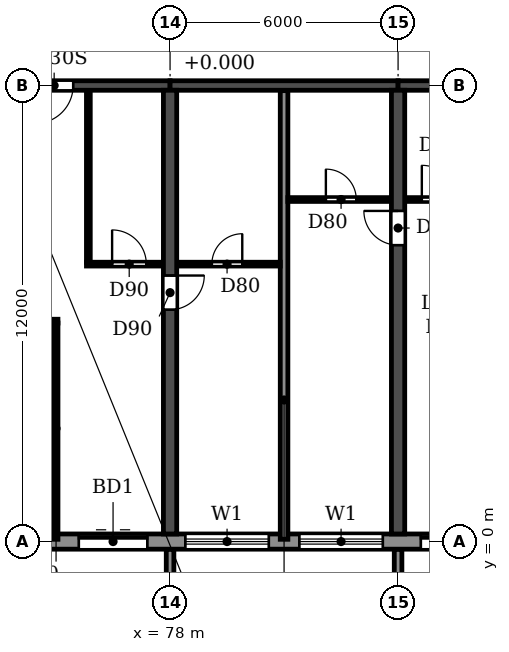
"""IFC4 building model, lengths in metres.
Left out: names, types, materials, properties, quantities, classifications, styles, units other than length and angle.
Written with IfcOpenShell. Run it as: python <this file> out.ifc"""

import sys

from ifc_helpers import new_model, si_unit, direction, frame, frame_2d, origin, place, context, subcontext, project, spatial, polyline, rectangle, outline, extrude, source, transform, mapped, element, fill, save


model = new_model("IFC4")
c1 = context("Model", 3, precision=1e-05, world=origin(), true_north=direction((0.0, 1.0)))
c2 = subcontext(c1, "Body", "Model", "MODEL_VIEW")
j1 = project(units=[si_unit("LENGTHUNIT", "METRE"), si_unit("PLANEANGLEUNIT", "RADIAN")], contexts=[c1])
p1 = place(None, origin())
s1 = spatial("IfcSite", under=j1, at=p1, CompositionType="ELEMENT")
p2 = place(p1, origin())
s2 = spatial("IfcBuilding", under=s1, at=p2, CompositionType="ELEMENT")
p3 = place(p2, frame((0.0, 0.0, 76.2)))
s3 = spatial("IfcBuildingStorey", under=s2, at=p3, CompositionType="ELEMENT", Elevation=76.2)
p4 = place(p3, frame((78.0, 0.2, 0.0), z_axis=(0.0, 0.0, 1.0), x_axis=(0.0, 1.0, 0.0)))
e1 = element("IfcWall", 1, at=p4, inside=s3, PredefinedType="SHEAR", context=c2, shape_type="SweptSolid", body=[
    extrude(rectangle(XDim=11.675, YDim=0.35, at=frame_2d((5.837, 0.0))), origin(), (0.0, 0.0, 1.0), 3.06),
])
p5 = place(p4, frame((5.9, 0.0, 0.0)))
e2 = element("IfcOpeningElement", 2, at=p5, cuts=e1, PredefinedType="OPENING", context=c2, shape_type="SweptSolid", body=[
    extrude(rectangle(XDim=0.9, YDim=2.1, at=frame_2d((0.45, 1.05))), frame((0.0, 0.185, 0.0), z_axis=(0.0, -1.0, 0.0), x_axis=(1.0, 0.0, 0.0)), (0.0, 0.0, 1.0), 0.37),
])
p6 = place(p3, frame((84.0, 0.2, 0.0), z_axis=(0.0, 0.0, 1.0), x_axis=(0.0, 1.0, 0.0)))
e3 = element("IfcWall", 3, at=p6, inside=s3, PredefinedType="SHEAR", context=c2, shape_type="SweptSolid", body=[
    extrude(rectangle(XDim=11.675, YDim=0.35, at=frame_2d((5.837, 0.0))), origin(), (0.0, 0.0, 1.0), 3.06),
])
p7 = place(p6, frame((7.6, 0.0, 0.0)))
e4 = element("IfcOpeningElement", 4, at=p7, cuts=e3, PredefinedType="OPENING", context=c2, shape_type="SweptSolid", body=[
    extrude(rectangle(XDim=0.9, YDim=2.1, at=frame_2d((0.45, 1.05))), frame((0.0, 0.185, 0.0), z_axis=(0.0, -1.0, 0.0), x_axis=(1.0, 0.0, 0.0)), (0.0, 0.0, 1.0), 0.37),
])
p8 = place(p3, frame((72.0, 12.0, 0.0), z_axis=(0.0, 0.0, 1.0), x_axis=(1.0, 0.0, 0.0)))
e5 = element("IfcWall", 5, at=p8, inside=s3, PredefinedType="SHEAR", context=c2, shape_type="SweptSolid", body=[
    extrude(rectangle(XDim=6.0, YDim=0.25, at=frame_2d((3.0, 0.0))), origin(), (0.0, 0.0, 1.0), 2.46),
])
p9 = place(p8, frame((2.45, 0.0, 0.0)))
e6 = element("IfcOpeningElement", 6, at=p9, cuts=e5, PredefinedType="OPENING", context=c2, shape_type="SweptSolid", body=[
    extrude(rectangle(XDim=1.0, YDim=2.1, at=frame_2d((0.5, 1.05))), frame((0.0, 0.135, 0.0), z_axis=(0.0, -1.0, 0.0), x_axis=(1.0, 0.0, 0.0)), (0.0, 0.0, 1.0), 0.27),
])
p10 = place(p3, frame((78.0, 12.0, 0.0), z_axis=(0.0, 0.0, 1.0), x_axis=(1.0, 0.0, 0.0)))
e7 = element("IfcWall", 7, at=p10, inside=s3, PredefinedType="SHEAR", context=c2, shape_type="SweptSolid", body=[
    extrude(rectangle(XDim=6.0, YDim=0.25, at=frame_2d((3.0, 0.0))), origin(), (0.0, 0.0, 1.0), 2.46),
])
p11 = place(p3, frame((84.0, 12.0, 0.0), z_axis=(0.0, 0.0, 1.0), x_axis=(1.0, 0.0, 0.0)))
e8 = element("IfcWall", 8, at=p11, inside=s3, PredefinedType="SHEAR", context=c2, shape_type="SweptSolid", body=[
    extrude(rectangle(XDim=6.0, YDim=0.25, at=frame_2d((3.0, 0.0))), origin(), (0.0, 0.0, 1.0), 2.46),
])
p12 = place(p11, frame((2.55, 0.0, 0.0)))
e9 = element("IfcOpeningElement", 9, at=p12, cuts=e8, PredefinedType="OPENING", context=c2, shape_type="SweptSolid", body=[
    extrude(rectangle(XDim=1.0, YDim=2.1, at=frame_2d((0.5, 1.05))), frame((0.0, 0.135, 0.0), z_axis=(0.0, -1.0, 0.0), x_axis=(1.0, 0.0, 0.0)), (0.0, 0.0, 1.0), 0.27),
])
p13 = place(p3, frame((10.683, 0.0, 0.0), z_axis=(0.0, 0.0, 1.0), x_axis=(1.0, 0.0, 0.0)))
e10 = element("IfcWall", 10, at=p13, inside=s3, PredefinedType="STANDARD", context=c2, shape_type="SweptSolid", body=[
    extrude(rectangle(XDim=80.634, YDim=0.4, at=frame_2d((40.317, 0.0))), origin(), (0.0, 0.0, 1.0), 3.06),
])
p14 = place(p13, frame((1.717, 0.0, 0.9)))
e11 = element("IfcOpeningElement", 11, at=p14, cuts=e10, PredefinedType="OPENING", context=c2, shape_type="SweptSolid", body=[
    extrude(rectangle(XDim=2.2, YDim=1.5, at=frame_2d((1.1, 0.75))), frame((0.0, 0.21, 0.0), z_axis=(0.0, -1.0, 0.0), x_axis=(1.0, 0.0, 0.0)), (0.0, 0.0, 1.0), 0.42),
])
p15 = place(p13, frame((4.917, 0.0, 0.0)))
e12 = element("IfcOpeningElement", 12, at=p15, cuts=e10, PredefinedType="OPENING", context=c2, shape_type="SweptSolid", body=[
    extrude(rectangle(XDim=1.8, YDim=2.4, at=frame_2d((0.9, 1.2))), frame((0.0, 0.21, 0.0), z_axis=(0.0, -1.0, 0.0), x_axis=(1.0, 0.0, 0.0)), (0.0, 0.0, 1.0), 0.42),
])
p16 = place(p13, frame((7.717, 0.0, 0.9)))
e13 = element("IfcOpeningElement", 13, at=p16, cuts=e10, PredefinedType="OPENING", context=c2, shape_type="SweptSolid", body=[
    extrude(rectangle(XDim=2.2, YDim=1.5, at=frame_2d((1.1, 0.75))), frame((0.0, 0.21, 0.0), z_axis=(0.0, -1.0, 0.0), x_axis=(1.0, 0.0, 0.0)), (0.0, 0.0, 1.0), 0.42),
])
p17 = place(p13, frame((10.717, 0.0, 0.9)))
e14 = element("IfcOpeningElement", 14, at=p17, cuts=e10, PredefinedType="OPENING", context=c2, shape_type="SweptSolid", body=[
    extrude(rectangle(XDim=2.2, YDim=1.5, at=frame_2d((1.1, 0.75))), frame((0.0, 0.21, 0.0), z_axis=(0.0, -1.0, 0.0), x_axis=(1.0, 0.0, 0.0)), (0.0, 0.0, 1.0), 0.42),
])
p18 = place(p13, frame((13.717, 0.0, 0.9)))
e15 = element("IfcOpeningElement", 15, at=p18, cuts=e10, PredefinedType="OPENING", context=c2, shape_type="SweptSolid", body=[
    extrude(rectangle(XDim=2.2, YDim=1.5, at=frame_2d((1.1, 0.75))), frame((0.0, 0.21, 0.0), z_axis=(0.0, -1.0, 0.0), x_axis=(1.0, 0.0, 0.0)), (0.0, 0.0, 1.0), 0.42),
])
p19 = place(p13, frame((16.917, 0.0, 0.0)))
e16 = element("IfcOpeningElement", 16, at=p19, cuts=e10, PredefinedType="OPENING", context=c2, shape_type="SweptSolid", body=[
    extrude(rectangle(XDim=1.8, YDim=2.4, at=frame_2d((0.9, 1.2))), frame((0.0, 0.21, 0.0), z_axis=(0.0, -1.0, 0.0), x_axis=(1.0, 0.0, 0.0)), (0.0, 0.0, 1.0), 0.42),
])
p20 = place(p13, frame((19.717, 0.0, 0.9)))
e17 = element("IfcOpeningElement", 17, at=p20, cuts=e10, PredefinedType="OPENING", context=c2, shape_type="SweptSolid", body=[
    extrude(rectangle(XDim=2.2, YDim=1.5, at=frame_2d((1.1, 0.75))), frame((0.0, 0.21, 0.0), z_axis=(0.0, -1.0, 0.0), x_axis=(1.0, 0.0, 0.0)), (0.0, 0.0, 1.0), 0.42),
])
p21 = place(p13, frame((22.717, 0.0, 0.9)))
e18 = element("IfcOpeningElement", 18, at=p21, cuts=e10, PredefinedType="OPENING", context=c2, shape_type="SweptSolid", body=[
    extrude(rectangle(XDim=2.2, YDim=1.5, at=frame_2d((1.1, 0.75))), frame((0.0, 0.21, 0.0), z_axis=(0.0, -1.0, 0.0), x_axis=(1.0, 0.0, 0.0)), (0.0, 0.0, 1.0), 0.42),
])
p22 = place(p13, frame((25.917, 0.0, 0.0)))
e19 = element("IfcOpeningElement", 19, at=p22, cuts=e10, PredefinedType="OPENING", context=c2, shape_type="SweptSolid", body=[
    extrude(rectangle(XDim=1.8, YDim=2.4, at=frame_2d((0.9, 1.2))), frame((0.0, 0.21, 0.0), z_axis=(0.0, -1.0, 0.0), x_axis=(1.0, 0.0, 0.0)), (0.0, 0.0, 1.0), 0.42),
])
p23 = place(p13, frame((28.717, 0.0, 0.9)))
e20 = element("IfcOpeningElement", 20, at=p23, cuts=e10, PredefinedType="OPENING", context=c2, shape_type="SweptSolid", body=[
    extrude(rectangle(XDim=2.2, YDim=1.5, at=frame_2d((1.1, 0.75))), frame((0.0, 0.21, 0.0), z_axis=(0.0, -1.0, 0.0), x_axis=(1.0, 0.0, 0.0)), (0.0, 0.0, 1.0), 0.42),
])
p24 = place(p13, frame((31.717, 0.0, 0.9)))
e21 = element("IfcOpeningElement", 21, at=p24, cuts=e10, PredefinedType="OPENING", context=c2, shape_type="SweptSolid", body=[
    extrude(rectangle(XDim=2.2, YDim=1.5, at=frame_2d((1.1, 0.75))), frame((0.0, 0.21, 0.0), z_axis=(0.0, -1.0, 0.0), x_axis=(1.0, 0.0, 0.0)), (0.0, 0.0, 1.0), 0.42),
])
p25 = place(p13, frame((34.717, 0.0, 0.9)))
e22 = element("IfcOpeningElement", 22, at=p25, cuts=e10, PredefinedType="OPENING", context=c2, shape_type="SweptSolid", body=[
    extrude(rectangle(XDim=2.2, YDim=1.5, at=frame_2d((1.1, 0.75))), frame((0.0, 0.21, 0.0), z_axis=(0.0, -1.0, 0.0), x_axis=(1.0, 0.0, 0.0)), (0.0, 0.0, 1.0), 0.42),
])
p26 = place(p13, frame((37.917, 0.0, 0.0)))
e23 = element("IfcOpeningElement", 23, at=p26, cuts=e10, PredefinedType="OPENING", context=c2, shape_type="SweptSolid", body=[
    extrude(rectangle(XDim=1.8, YDim=2.4, at=frame_2d((0.9, 1.2))), frame((0.0, 0.21, 0.0), z_axis=(0.0, -1.0, 0.0), x_axis=(1.0, 0.0, 0.0)), (0.0, 0.0, 1.0), 0.42),
])
p27 = place(p13, frame((40.717, 0.0, 0.9)))
e24 = element("IfcOpeningElement", 24, at=p27, cuts=e10, PredefinedType="OPENING", context=c2, shape_type="SweptSolid", body=[
    extrude(rectangle(XDim=2.2, YDim=1.5, at=frame_2d((1.1, 0.75))), frame((0.0, 0.21, 0.0), z_axis=(0.0, -1.0, 0.0), x_axis=(1.0, 0.0, 0.0)), (0.0, 0.0, 1.0), 0.42),
])
p28 = place(p13, frame((43.717, 0.0, 0.9)))
e25 = element("IfcOpeningElement", 25, at=p28, cuts=e10, PredefinedType="OPENING", context=c2, shape_type="SweptSolid", body=[
    extrude(rectangle(XDim=2.2, YDim=1.5, at=frame_2d((1.1, 0.75))), frame((0.0, 0.21, 0.0), z_axis=(0.0, -1.0, 0.0), x_axis=(1.0, 0.0, 0.0)), (0.0, 0.0, 1.0), 0.42),
])
p29 = place(p13, frame((46.717, 0.0, 0.9)))
e26 = element("IfcOpeningElement", 26, at=p29, cuts=e10, PredefinedType="OPENING", context=c2, shape_type="SweptSolid", body=[
    extrude(rectangle(XDim=2.2, YDim=1.5, at=frame_2d((1.1, 0.75))), frame((0.0, 0.21, 0.0), z_axis=(0.0, -1.0, 0.0), x_axis=(1.0, 0.0, 0.0)), (0.0, 0.0, 1.0), 0.42),
])
p30 = place(p13, frame((49.917, 0.0, 0.0)))
e27 = element("IfcOpeningElement", 27, at=p30, cuts=e10, PredefinedType="OPENING", context=c2, shape_type="SweptSolid", body=[
    extrude(rectangle(XDim=1.8, YDim=2.4, at=frame_2d((0.9, 1.2))), frame((0.0, 0.21, 0.0), z_axis=(0.0, -1.0, 0.0), x_axis=(1.0, 0.0, 0.0)), (0.0, 0.0, 1.0), 0.42),
])
p31 = place(p13, frame((52.717, 0.0, 0.9)))
e28 = element("IfcOpeningElement", 28, at=p31, cuts=e10, PredefinedType="OPENING", context=c2, shape_type="SweptSolid", body=[
    extrude(rectangle(XDim=2.2, YDim=1.5, at=frame_2d((1.1, 0.75))), frame((0.0, 0.21, 0.0), z_axis=(0.0, -1.0, 0.0), x_axis=(1.0, 0.0, 0.0)), (0.0, 0.0, 1.0), 0.42),
])
p32 = place(p13, frame((55.717, 0.0, 0.9)))
e29 = element("IfcOpeningElement", 29, at=p32, cuts=e10, PredefinedType="OPENING", context=c2, shape_type="SweptSolid", body=[
    extrude(rectangle(XDim=2.2, YDim=1.5, at=frame_2d((1.1, 0.75))), frame((0.0, 0.21, 0.0), z_axis=(0.0, -1.0, 0.0), x_axis=(1.0, 0.0, 0.0)), (0.0, 0.0, 1.0), 0.42),
])
p33 = place(p13, frame((58.717, 0.0, 0.9)))
e30 = element("IfcOpeningElement", 30, at=p33, cuts=e10, PredefinedType="OPENING", context=c2, shape_type="SweptSolid", body=[
    extrude(rectangle(XDim=2.2, YDim=1.5, at=frame_2d((1.1, 0.75))), frame((0.0, 0.21, 0.0), z_axis=(0.0, -1.0, 0.0), x_axis=(1.0, 0.0, 0.0)), (0.0, 0.0, 1.0), 0.42),
])
p34 = place(p13, frame((61.717, 0.0, 0.9)))
e31 = element("IfcOpeningElement", 31, at=p34, cuts=e10, PredefinedType="OPENING", context=c2, shape_type="SweptSolid", body=[
    extrude(rectangle(XDim=2.2, YDim=1.5, at=frame_2d((1.1, 0.75))), frame((0.0, 0.21, 0.0), z_axis=(0.0, -1.0, 0.0), x_axis=(1.0, 0.0, 0.0)), (0.0, 0.0, 1.0), 0.42),
])
p35 = place(p13, frame((64.917, 0.0, 0.0)))
e32 = element("IfcOpeningElement", 32, at=p35, cuts=e10, PredefinedType="OPENING", context=c2, shape_type="SweptSolid", body=[
    extrude(rectangle(XDim=1.8, YDim=2.4, at=frame_2d((0.9, 1.2))), frame((0.0, 0.21, 0.0), z_axis=(0.0, -1.0, 0.0), x_axis=(1.0, 0.0, 0.0)), (0.0, 0.0, 1.0), 0.42),
])
p36 = place(p13, frame((67.717, 0.0, 0.9)))
e33 = element("IfcOpeningElement", 33, at=p36, cuts=e10, PredefinedType="OPENING", context=c2, shape_type="SweptSolid", body=[
    extrude(rectangle(XDim=2.2, YDim=1.5, at=frame_2d((1.1, 0.75))), frame((0.0, 0.21, 0.0), z_axis=(0.0, -1.0, 0.0), x_axis=(1.0, 0.0, 0.0)), (0.0, 0.0, 1.0), 0.42),
])
p37 = place(p13, frame((70.717, 0.0, 0.9)))
e34 = element("IfcOpeningElement", 34, at=p37, cuts=e10, PredefinedType="OPENING", context=c2, shape_type="SweptSolid", body=[
    extrude(rectangle(XDim=2.2, YDim=1.5, at=frame_2d((1.1, 0.75))), frame((0.0, 0.21, 0.0), z_axis=(0.0, -1.0, 0.0), x_axis=(1.0, 0.0, 0.0)), (0.0, 0.0, 1.0), 0.42),
])
p38 = place(p13, frame((73.917, 0.0, 0.0)))
e35 = element("IfcOpeningElement", 35, at=p38, cuts=e10, PredefinedType="OPENING", context=c2, shape_type="SweptSolid", body=[
    extrude(rectangle(XDim=1.8, YDim=2.4, at=frame_2d((0.9, 1.2))), frame((0.0, 0.21, 0.0), z_axis=(0.0, -1.0, 0.0), x_axis=(1.0, 0.0, 0.0)), (0.0, 0.0, 1.0), 0.42),
])
p39 = place(p13, frame((76.717, 0.0, 0.9)))
e36 = element("IfcOpeningElement", 36, at=p39, cuts=e10, PredefinedType="OPENING", context=c2, shape_type="SweptSolid", body=[
    extrude(rectangle(XDim=2.2, YDim=1.5, at=frame_2d((1.1, 0.75))), frame((0.0, 0.21, 0.0), z_axis=(0.0, -1.0, 0.0), x_axis=(1.0, 0.0, 0.0)), (0.0, 0.0, 1.0), 0.42),
])
m1 = source(origin(), c2, "Body", "SweptSolid", [
    extrude(outline(polyline([(0.0, 0.0), (0.2, 0.0), (0.2, 1.65), (0.0, 1.65), (0.0, 0.0)])), origin(), (0.0, 0.0, 1.0), 3.1),
])
for number, where in (
    (37, (77.9, -1.85, 0.0)),
    (38, (83.9, -1.85, 0.0)),
):
    element("IfcWall", number, at=place(p3, frame(where)), inside=s3, PredefinedType="STANDARD", context=c2, shape_type="MappedRepresentation", body=[
        mapped(m1, transform((0.0, 0.0, 0.0))),
    ])
p40 = place(p3, frame((81.0, 0.06, 0.0), z_axis=(0.0, 0.0, 1.0), x_axis=(0.0, 1.0, 0.0)))
e39 = element("IfcWall", 39, at=p40, inside=s3, PredefinedType="PARTITIONING", context=c2, shape_type="SweptSolid", body=[
    extrude(rectangle(XDim=11.805, YDim=0.2, at=frame_2d((5.902, 0.0))), origin(), (0.0, 0.0, 1.0), 3.06),
])
p41 = place(p3, frame((72.185, 5.8, 0.0), z_axis=(0.0, 0.0, 1.0), x_axis=(1.0, 0.0, 0.0)))
e40 = element("IfcWall", 40, at=p41, inside=s3, PredefinedType="PARTITIONING", context=c2, shape_type="SweptSolid", body=[
    extrude(rectangle(XDim=2.865, YDim=0.1, at=frame_2d((1.433, 0.0))), origin(), (0.0, 0.0, 1.0), 3.06),
])
p42 = place(p41, frame((1.415, 0.0, 0.0)))
e41 = element("IfcOpeningElement", 41, at=p42, cuts=e40, PredefinedType="OPENING", context=c2, shape_type="SweptSolid", body=[
    extrude(rectangle(XDim=0.9, YDim=2.1, at=frame_2d((0.45, 1.05))), frame((0.0, 0.06, 0.0), z_axis=(0.0, -1.0, 0.0), x_axis=(1.0, 0.0, 0.0)), (0.0, 0.0, 1.0), 0.12),
])
p43 = place(p3, frame((75.8, 7.3, 0.0), z_axis=(0.0, 0.0, 1.0), x_axis=(1.0, 0.0, 0.0)))
e42 = element("IfcWall", 42, at=p43, inside=s3, PredefinedType="PARTITIONING", context=c2, shape_type="SweptSolid", body=[
    extrude(rectangle(XDim=2.015, YDim=0.1, at=frame_2d((1.007, 0.0))), origin(), (0.0, 0.0, 1.0), 3.06),
])
p44 = place(p43, frame((0.675, 0.0, 0.0)))
e43 = element("IfcOpeningElement", 43, at=p44, cuts=e42, PredefinedType="OPENING", context=c2, shape_type="SweptSolid", body=[
    extrude(rectangle(XDim=0.9, YDim=2.1, at=frame_2d((0.45, 1.05))), frame((0.0, 0.06, 0.0), z_axis=(0.0, -1.0, 0.0), x_axis=(1.0, 0.0, 0.0)), (0.0, 0.0, 1.0), 0.12),
])
p45 = place(p3, frame((78.185, 7.3, 0.0), z_axis=(0.0, 0.0, 1.0), x_axis=(1.0, 0.0, 0.0)))
e44 = element("IfcWall", 44, at=p45, inside=s3, PredefinedType="PARTITIONING", context=c2, shape_type="SweptSolid", body=[
    extrude(rectangle(XDim=2.715, YDim=0.1, at=frame_2d((1.357, 0.0))), origin(), (0.0, 0.0, 1.0), 3.06),
])
p46 = place(p45, frame((0.915, 0.0, 0.0)))
e45 = element("IfcOpeningElement", 45, at=p46, cuts=e44, PredefinedType="OPENING", context=c2, shape_type="SweptSolid", body=[
    extrude(rectangle(XDim=0.8, YDim=2.1, at=frame_2d((0.4, 1.05))), frame((0.0, 0.06, 0.0), z_axis=(0.0, -1.0, 0.0), x_axis=(1.0, 0.0, 0.0)), (0.0, 0.0, 1.0), 0.12),
])
p47 = place(p3, frame((81.1, 9.0, 0.0), z_axis=(0.0, 0.0, 1.0), x_axis=(1.0, 0.0, 0.0)))
e46 = element("IfcWall", 46, at=p47, inside=s3, PredefinedType="PARTITIONING", context=c2, shape_type="SweptSolid", body=[
    extrude(rectangle(XDim=2.715, YDim=0.1, at=frame_2d((1.357, 0.0))), origin(), (0.0, 0.0, 1.0), 3.06),
])
p48 = place(p47, frame((1.0, 0.0, 0.0)))
e47 = element("IfcOpeningElement", 47, at=p48, cuts=e46, PredefinedType="OPENING", context=c2, shape_type="SweptSolid", body=[
    extrude(rectangle(XDim=0.8, YDim=2.1, at=frame_2d((0.4, 1.05))), frame((0.0, 0.06, 0.0), z_axis=(0.0, -1.0, 0.0), x_axis=(1.0, 0.0, 0.0)), (0.0, 0.0, 1.0), 0.12),
])
p49 = place(p3, frame((84.185, 9.0, 0.0), z_axis=(0.0, 0.0, 1.0), x_axis=(1.0, 0.0, 0.0)))
e48 = element("IfcWall", 48, at=p49, inside=s3, PredefinedType="PARTITIONING", context=c2, shape_type="SweptSolid", body=[
    extrude(rectangle(XDim=2.015, YDim=0.1, at=frame_2d((1.007, 0.0))), origin(), (0.0, 0.0, 1.0), 3.06),
])
p50 = place(p49, frame((0.44, 0.0, 0.0)))
e49 = element("IfcOpeningElement", 49, at=p50, cuts=e48, PredefinedType="OPENING", context=c2, shape_type="SweptSolid", body=[
    extrude(rectangle(XDim=0.9, YDim=2.1, at=frame_2d((0.45, 1.05))), frame((0.0, 0.06, 0.0), z_axis=(0.0, -1.0, 0.0), x_axis=(1.0, 0.0, 0.0)), (0.0, 0.0, 1.0), 0.12),
])
p51 = place(p3, frame((75.0, 0.06, 0.0), z_axis=(0.0, 0.0, 1.0), x_axis=(0.0, 1.0, 0.0)))
e50 = element("IfcWall", 50, at=p51, inside=s3, PredefinedType="PARTITIONING", context=c2, shape_type="SweptSolid", body=[
    extrude(rectangle(XDim=5.69, YDim=0.1, at=frame_2d((2.845, 0.0))), origin(), (0.0, 0.0, 1.0), 3.06),
])
p52 = place(p3, frame((75.85, 7.35, 0.0), z_axis=(0.0, 0.0, 1.0), x_axis=(0.0, 1.0, 0.0)))
e51 = element("IfcWall", 51, at=p52, inside=s3, PredefinedType="PARTITIONING", context=c2, shape_type="SweptSolid", body=[
    extrude(rectangle(XDim=4.515, YDim=0.1, at=frame_2d((2.257, 0.0))), origin(), (0.0, 0.0, 1.0), 3.06),
])
p53 = place(p35, origin())
e52 = element("IfcDoor", 52, at=p53, inside=s3, OperationType="DOUBLE_DOOR_SLIDING", PredefinedType="DOOR", context=c2, shape_type="SweptSolid", body=[
    extrude(rectangle(XDim=1.8, YDim=2.4, at=frame_2d((0.9, 1.2))), frame((0.0, 0.025, 0.0), z_axis=(0.0, -1.0, 0.0), x_axis=(1.0, 0.0, 0.0)), (0.0, 0.0, 1.0), 0.05),
])
fill(e32, e52)
p54 = place(p36, origin())
e53 = element("IfcWindow", 53, at=p54, inside=s3, PartitioningType="DOUBLE_PANEL_HORIZONTAL", PredefinedType="WINDOW", context=c2, shape_type="SweptSolid", body=[
    extrude(rectangle(XDim=2.2, YDim=1.5, at=frame_2d((1.1, 0.75))), frame((0.0, 0.03, 0.0), z_axis=(0.0, -1.0, 0.0), x_axis=(1.0, 0.0, 0.0)), (0.0, 0.0, 1.0), 0.06),
])
fill(e33, e53)
p55 = place(p37, origin())
e54 = element("IfcWindow", 54, at=p55, inside=s3, PartitioningType="DOUBLE_PANEL_HORIZONTAL", PredefinedType="WINDOW", context=c2, shape_type="SweptSolid", body=[
    extrude(rectangle(XDim=2.2, YDim=1.5, at=frame_2d((1.1, 0.75))), frame((0.0, 0.03, 0.0), z_axis=(0.0, -1.0, 0.0), x_axis=(1.0, 0.0, 0.0)), (0.0, 0.0, 1.0), 0.06),
])
fill(e34, e54)
p56 = place(p38, origin())
e55 = element("IfcDoor", 55, at=p56, inside=s3, OperationType="DOUBLE_DOOR_SLIDING", PredefinedType="DOOR", context=c2, shape_type="SweptSolid", body=[
    extrude(rectangle(XDim=1.8, YDim=2.4, at=frame_2d((0.9, 1.2))), frame((0.0, 0.025, 0.0), z_axis=(0.0, -1.0, 0.0), x_axis=(1.0, 0.0, 0.0)), (0.0, 0.0, 1.0), 0.05),
])
fill(e35, e55)
p57 = place(p46, origin())
e56 = element("IfcDoor", 56, at=p57, inside=s3, OperationType="SINGLE_SWING_RIGHT", PredefinedType="DOOR", context=c2, shape_type="SweptSolid", body=[
    extrude(rectangle(XDim=0.8, YDim=2.1, at=frame_2d((0.4, 1.05))), frame((0.0, 0.025, 0.0), z_axis=(0.0, -1.0, 0.0), x_axis=(1.0, 0.0, 0.0)), (0.0, 0.0, 1.0), 0.05),
])
fill(e45, e56)
p58 = place(p9, frame((1.0, 0.0, 0.0), z_axis=(0.0, 0.0, 1.0), x_axis=(-1.0, 0.0, 0.0)))
e57 = element("IfcDoor", 57, at=p58, inside=s3, OperationType="SINGLE_SWING_RIGHT", PredefinedType="DOOR", context=c2, shape_type="SweptSolid", body=[
    extrude(rectangle(XDim=1.0, YDim=2.1, at=frame_2d((0.5, 1.05))), frame((0.0, 0.025, 0.0), z_axis=(0.0, -1.0, 0.0), x_axis=(1.0, 0.0, 0.0)), (0.0, 0.0, 1.0), 0.05),
])
fill(e6, e57)
p59 = place(p44, origin())
e58 = element("IfcDoor", 58, at=p59, inside=s3, OperationType="SINGLE_SWING_LEFT", PredefinedType="DOOR", context=c2, shape_type="SweptSolid", body=[
    extrude(rectangle(XDim=0.9, YDim=2.1, at=frame_2d((0.45, 1.05))), frame((0.0, 0.025, 0.0), z_axis=(0.0, -1.0, 0.0), x_axis=(1.0, 0.0, 0.0)), (0.0, 0.0, 1.0), 0.05),
])
fill(e43, e58)
p60 = place(p5, frame((0.9, 0.0, 0.0), z_axis=(0.0, 0.0, 1.0), x_axis=(-1.0, 0.0, 0.0)))
e59 = element("IfcDoor", 59, at=p60, inside=s3, OperationType="SINGLE_SWING_LEFT", PredefinedType="DOOR", context=c2, shape_type="SweptSolid", body=[
    extrude(rectangle(XDim=0.9, YDim=2.1, at=frame_2d((0.45, 1.05))), frame((0.0, 0.025, 0.0), z_axis=(0.0, -1.0, 0.0), x_axis=(1.0, 0.0, 0.0)), (0.0, 0.0, 1.0), 0.05),
])
fill(e2, e59)
p61 = place(p48, origin())
e60 = element("IfcDoor", 60, at=p61, inside=s3, OperationType="SINGLE_SWING_LEFT", PredefinedType="DOOR", context=c2, shape_type="SweptSolid", body=[
    extrude(rectangle(XDim=0.8, YDim=2.1, at=frame_2d((0.4, 1.05))), frame((0.0, 0.025, 0.0), z_axis=(0.0, -1.0, 0.0), x_axis=(1.0, 0.0, 0.0)), (0.0, 0.0, 1.0), 0.05),
])
fill(e47, e60)
p62 = place(p7, origin())
e61 = element("IfcDoor", 61, at=p62, inside=s3, OperationType="SINGLE_SWING_RIGHT", PredefinedType="DOOR", context=c2, shape_type="SweptSolid", body=[
    extrude(rectangle(XDim=0.9, YDim=2.1, at=frame_2d((0.45, 1.05))), frame((0.0, 0.025, 0.0), z_axis=(0.0, -1.0, 0.0), x_axis=(1.0, 0.0, 0.0)), (0.0, 0.0, 1.0), 0.05),
])
fill(e4, e61)
p63 = place(p50, origin())
e62 = element("IfcDoor", 62, at=p63, inside=s3, OperationType="SINGLE_SWING_LEFT", PredefinedType="DOOR", context=c2, shape_type="SweptSolid", body=[
    extrude(rectangle(XDim=0.9, YDim=2.1, at=frame_2d((0.45, 1.05))), frame((0.0, 0.025, 0.0), z_axis=(0.0, -1.0, 0.0), x_axis=(1.0, 0.0, 0.0)), (0.0, 0.0, 1.0), 0.05),
])
fill(e49, e62)
save(model, sys.argv[1])
